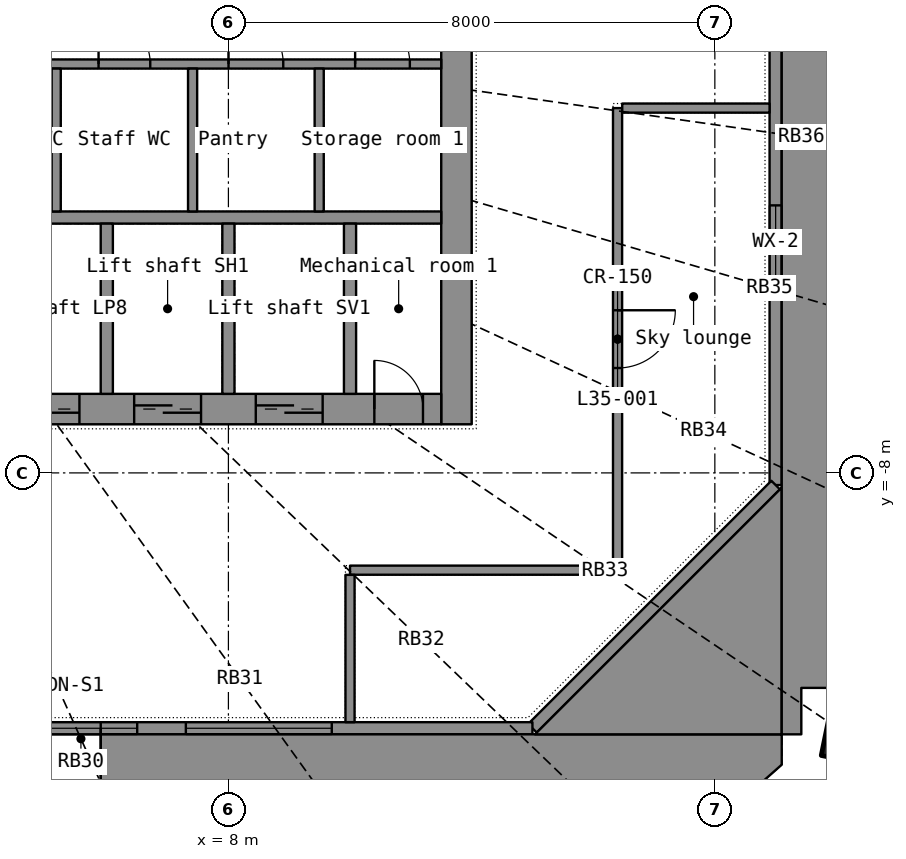
"""IFC4 building model, lengths in metres.
Left out: names, types, materials, properties, quantities, classifications, styles, units other than length and angle.
Written with IfcOpenShell. Run it as: python <this file> out.ifc"""

import sys

from ifc_helpers import new_model, si_unit, direction, frame, frame_2d, origin, origin_2d, place, context, subcontext, project, spatial, polyline, rectangle, hollow_rectangle, outline, extrude, element, fill, save


model = new_model("IFC4")
c1 = context("Model", 3, precision=1e-05, world=origin(), true_north=direction((0.0, 1.0)))
c2 = subcontext(c1, "Body", "Model", "MODEL_VIEW")
j1 = project(units=[si_unit("LENGTHUNIT", "METRE"), si_unit("PLANEANGLEUNIT", "RADIAN")], contexts=[c1])
p1 = place(None, origin())
s1 = spatial("IfcSite", under=j1, at=p1, CompositionType="ELEMENT")
p2 = place(p1, origin())
s2 = spatial("IfcBuilding", under=s1, at=p2, CompositionType="ELEMENT")
p3 = place(p2, frame((0.0, 0.0, 145.2)))
s3 = spatial("IfcBuildingStorey", under=s2, at=p3, CompositionType="ELEMENT", Elevation=145.2)
p4 = place(p3, frame((18.222, -12.336, 0.0), z_axis=(-0.026511305, 0.018201791, 0.999482789), x_axis=(-0.720044306, -0.693898, -0.00646247)))
e1 = element("IfcColumn", 1, at=p4, inside=s3, PredefinedType="COLUMN", context=c2, shape_type="SweptSolid", body=[
    extrude(hollow_rectangle(XDim=0.8, YDim=0.8, WallThickness=0.025, at=origin_2d()), origin(), (0.0, 0.0, 1.0), 7.404),
])
p5 = place(p3, frame((17.0, 8.2, 0.08), z_axis=(0.0, 0.0, 1.0), x_axis=(0.0, -1.0, 0.0)))
e2 = element("IfcWall", 2, at=p5, inside=s3, PredefinedType="STANDARD", context=c2, shape_type="SweptSolid", body=[
    extrude(rectangle(XDim=16.4, YDim=0.2, at=frame_2d((8.2, 0.0))), origin(), (0.0, 0.0, 1.0), 7.12),
])
p6 = place(p5, frame((7.3, 0.0, 0.0)))
e3 = element("IfcOpeningElement", 3, at=p6, cuts=e2, PredefinedType="OPENING", context=c2, shape_type="SweptSolid", body=[
    extrude(rectangle(XDim=1.8, YDim=2.4, at=frame_2d((0.9, 1.2))), frame((0.0, 0.11, 0.0), z_axis=(0.0, -1.0, 0.0), x_axis=(1.0, 0.0, 0.0)), (0.0, 0.0, 1.0), 0.22),
])
p7 = place(p5, frame((3.4, 0.0, 0.1)))
e4 = element("IfcOpeningElement", 4, at=p7, cuts=e2, PredefinedType="OPENING", context=c2, shape_type="SweptSolid", body=[
    extrude(rectangle(XDim=1.2, YDim=2.2, at=frame_2d((0.6, 1.1))), frame((0.0, 0.11, 0.0), z_axis=(0.0, -1.0, 0.0), x_axis=(1.0, 0.0, 0.0)), (0.0, 0.0, 1.0), 0.22),
])
p8 = place(p5, frame((11.8, 0.0, 0.1)))
e5 = element("IfcOpeningElement", 5, at=p8, cuts=e2, PredefinedType="OPENING", context=c2, shape_type="SweptSolid", body=[
    extrude(rectangle(XDim=1.2, YDim=2.2, at=frame_2d((0.6, 1.1))), frame((0.0, 0.11, 0.0), z_axis=(0.0, -1.0, 0.0), x_axis=(1.0, 0.0, 0.0)), (0.0, 0.0, 1.0), 0.22),
])
p9 = place(p3, frame((17.0, -8.2, 0.08), z_axis=(0.0, 0.0, 1.0), x_axis=(-0.707106781, -0.707106781, 0.0)))
e6 = element("IfcWall", 6, at=p9, inside=s3, PredefinedType="STANDARD", context=c2, shape_type="SweptSolid", body=[
    extrude(rectangle(XDim=5.657, YDim=0.2, at=frame_2d((2.828, 0.0))), origin(), (0.0, 0.0, 1.0), 7.12),
])
p10 = place(p3, frame((13.0, -12.2, 0.08), z_axis=(0.0, 0.0, 1.0), x_axis=(-1.0, 0.0, 0.0)))
e7 = element("IfcWall", 7, at=p10, inside=s3, PredefinedType="STANDARD", context=c2, shape_type="SweptSolid", body=[
    extrude(rectangle(XDim=26.0, YDim=0.2, at=frame_2d((13.0, 0.0))), origin(), (0.0, 0.0, 1.0), 7.12),
])
p11 = place(p10, frame((7.1, 0.0, 0.0)))
e8 = element("IfcOpeningElement", 8, at=p11, cuts=e7, PredefinedType="OPENING", context=c2, shape_type="SweptSolid", body=[
    extrude(rectangle(XDim=1.8, YDim=2.4, at=frame_2d((0.9, 1.2))), frame((0.0, 0.11, 0.0), z_axis=(0.0, -1.0, 0.0), x_axis=(1.0, 0.0, 0.0)), (0.0, 0.0, 1.0), 0.22),
])
p12 = place(p10, frame((17.1, 0.0, 0.0)))
e9 = element("IfcOpeningElement", 9, at=p12, cuts=e7, PredefinedType="OPENING", context=c2, shape_type="SweptSolid", body=[
    extrude(rectangle(XDim=1.8, YDim=2.4, at=frame_2d((0.9, 1.2))), frame((0.0, 0.11, 0.0), z_axis=(0.0, -1.0, 0.0), x_axis=(1.0, 0.0, 0.0)), (0.0, 0.0, 1.0), 0.22),
])
p13 = place(p10, frame((3.3, 0.0, 0.9)))
e10 = element("IfcOpeningElement", 10, at=p13, cuts=e7, PredefinedType="OPENING", context=c2, shape_type="SweptSolid", body=[
    extrude(rectangle(XDim=2.4, YDim=1.5, at=frame_2d((1.2, 0.75))), frame((0.0, 0.11, 0.0), z_axis=(0.0, -1.0, 0.0), x_axis=(1.0, 0.0, 0.0)), (0.0, 0.0, 1.0), 0.22),
])
p14 = place(p10, frame((11.8, 0.0, 0.9)))
e11 = element("IfcOpeningElement", 11, at=p14, cuts=e7, PredefinedType="OPENING", context=c2, shape_type="SweptSolid", body=[
    extrude(rectangle(XDim=2.4, YDim=1.5, at=frame_2d((1.2, 0.75))), frame((0.0, 0.11, 0.0), z_axis=(0.0, -1.0, 0.0), x_axis=(1.0, 0.0, 0.0)), (0.0, 0.0, 1.0), 0.22),
])
p15 = place(p10, frame((20.3, 0.0, 0.9)))
e12 = element("IfcOpeningElement", 12, at=p15, cuts=e7, PredefinedType="OPENING", context=c2, shape_type="SweptSolid", body=[
    extrude(rectangle(XDim=2.4, YDim=1.5, at=frame_2d((1.2, 0.75))), frame((0.0, 0.11, 0.0), z_axis=(0.0, -1.0, 0.0), x_axis=(1.0, 0.0, 0.0)), (0.0, 0.0, 1.0), 0.22),
])
p16 = place(p10, frame((6.5, 0.0, 3.2)))
e13 = element("IfcOpeningElement", 13, at=p16, cuts=e7, PredefinedType="OPENING", context=c2, shape_type="SweptSolid", body=[
    extrude(rectangle(XDim=3.0, YDim=1.0, at=frame_2d((1.5, 0.5))), frame((0.0, 0.11, 0.0), z_axis=(0.0, -1.0, 0.0), x_axis=(1.0, 0.0, 0.0)), (0.0, 0.0, 1.0), 0.22),
])
p17 = place(p10, frame((16.5, 0.0, 3.2)))
e14 = element("IfcOpeningElement", 14, at=p17, cuts=e7, PredefinedType="OPENING", context=c2, shape_type="SweptSolid", body=[
    extrude(rectangle(XDim=3.0, YDim=1.0, at=frame_2d((1.5, 0.5))), frame((0.0, 0.11, 0.0), z_axis=(0.0, -1.0, 0.0), x_axis=(1.0, 0.0, 0.0)), (0.0, 0.0, 1.0), 0.22),
])
p18 = place(p3, frame((0.0, 0.0, -0.4)))
e15 = element("IfcWall", 15, at=p18, inside=s3, PredefinedType="ELEMENTEDWALL", context=c2, shape_type="SweptSolid", body=[
    extrude(outline(polyline([(17.1, -12.8), (17.1, -12.3), (13.042, -12.3), (5.9, -12.3), (5.9, -18.26), (6.031, -18.236), (7.357, -17.898), (7.357, -17.304), (8.957, -17.304), (8.957, -17.41), (9.848, -17.111), (10.763, -16.725), (10.763, -15.372), (12.813, -15.372), (12.813, -15.75), (13.366, -15.465), (14.506, -14.757), (14.506, -13.924), (15.704, -13.924), (16.478, -13.35), (17.1, -12.8)])), origin(), (0.0, 0.0, 1.0), 1.58),
])
p19 = place(p3, frame((0.0, 0.0, -0.4)))
e16 = element("IfcWall", 16, at=p19, inside=s3, PredefinedType="ELEMENTEDWALL", context=c2, shape_type="SweptSolid", body=[
    extrude(outline(polyline([(13.042, -12.3), (17.1, -12.3), (17.1, -8.241), (13.042, -12.3)])), origin(), (0.0, 0.0, 1.0), 1.58),
])
p20 = place(p3, frame((0.0, 0.0, -0.4)))
e17 = element("IfcWall", 17, at=p20, inside=s3, PredefinedType="ELEMENTEDWALL", context=c2, shape_type="SweptSolid", body=[
    extrude(outline(polyline([(22.509, -4.886), (22.719, -4.119), (22.562, -4.119), (22.562, -2.519), (23.072, -2.519), (23.214, -1.646), (23.248, -1.025), (22.392, -1.025), (22.392, -0.9), (17.1, -0.9), (17.1, -8.241), (17.1, -12.3), (17.422, -12.3), (17.422, -11.536), (18.419, -11.536), (19.088, -10.829), (19.4, -10.432), (19.308, -10.432), (19.308, -8.382), (20.86, -8.382), (21.119, -7.979), (21.507, -7.221), (21.507, -5.744), (22.175, -5.744), (22.509, -4.886)])), origin(), (0.0, 0.0, 1.0), 1.58),
])
p21 = place(p3, frame((11.75, -7.2, 0.0), z_axis=(0.0, 0.0, 1.0), x_axis=(0.0, 1.0, 0.0)))
e18 = element("IfcWall", 18, at=p21, inside=s3, PredefinedType="SHEAR", context=c2, shape_type="SweptSolid", body=[
    extrude(rectangle(XDim=14.4, YDim=0.5, at=frame_2d((7.2, 0.0))), origin(), (0.0, 0.0, 1.0), 7.0),
])
p22 = place(p21, frame((6.5, 0.0, 0.0)))
e19 = element("IfcOpeningElement", 19, at=p22, cuts=e18, PredefinedType="OPENING", context=c2, shape_type="SweptSolid", body=[
    extrude(rectangle(XDim=1.4, YDim=2.2, at=frame_2d((0.7, 1.1))), frame((0.0, 0.26, 0.0), z_axis=(0.0, -1.0, 0.0), x_axis=(1.0, 0.0, 0.0)), (0.0, 0.0, 1.0), 0.52),
])
p23 = place(p3, frame((-11.5, -6.95, 0.0), z_axis=(0.0, 0.0, 1.0), x_axis=(1.0, 0.0, 0.0)))
e20 = element("IfcWall", 20, at=p23, inside=s3, PredefinedType="SHEAR", context=c2, shape_type="SweptSolid", body=[
    extrude(rectangle(XDim=23.0, YDim=0.5, at=frame_2d((11.5, 0.0))), origin(), (0.0, 0.0, 1.0), 7.0),
])
p24 = place(p23, frame((1.95, 0.0, 0.0)))
e21 = element("IfcOpeningElement", 21, at=p24, cuts=e20, PredefinedType="OPENING", context=c2, shape_type="SweptSolid", body=[
    extrude(rectangle(XDim=1.1, YDim=2.2, at=frame_2d((0.55, 1.1))), frame((0.0, 0.26, 0.0), z_axis=(0.0, -1.0, 0.0), x_axis=(1.0, 0.0, 0.0)), (0.0, 0.0, 1.0), 0.52),
])
p25 = place(p23, frame((3.95, 0.0, 0.0)))
e22 = element("IfcOpeningElement", 22, at=p25, cuts=e20, PredefinedType="OPENING", context=c2, shape_type="SweptSolid", body=[
    extrude(rectangle(XDim=1.1, YDim=2.2, at=frame_2d((0.55, 1.1))), frame((0.0, 0.26, 0.0), z_axis=(0.0, -1.0, 0.0), x_axis=(1.0, 0.0, 0.0)), (0.0, 0.0, 1.0), 0.52),
])
p26 = place(p23, frame((5.95, 0.0, 0.0)))
e23 = element("IfcOpeningElement", 23, at=p26, cuts=e20, PredefinedType="OPENING", context=c2, shape_type="SweptSolid", body=[
    extrude(rectangle(XDim=1.1, YDim=2.2, at=frame_2d((0.55, 1.1))), frame((0.0, 0.26, 0.0), z_axis=(0.0, -1.0, 0.0), x_axis=(1.0, 0.0, 0.0)), (0.0, 0.0, 1.0), 0.52),
])
p27 = place(p23, frame((7.95, 0.0, 0.0)))
e24 = element("IfcOpeningElement", 24, at=p27, cuts=e20, PredefinedType="OPENING", context=c2, shape_type="SweptSolid", body=[
    extrude(rectangle(XDim=1.1, YDim=2.2, at=frame_2d((0.55, 1.1))), frame((0.0, 0.26, 0.0), z_axis=(0.0, -1.0, 0.0), x_axis=(1.0, 0.0, 0.0)), (0.0, 0.0, 1.0), 0.52),
])
p28 = place(p23, frame((9.95, 0.0, 0.0)))
e25 = element("IfcOpeningElement", 25, at=p28, cuts=e20, PredefinedType="OPENING", context=c2, shape_type="SweptSolid", body=[
    extrude(rectangle(XDim=1.1, YDim=2.2, at=frame_2d((0.55, 1.1))), frame((0.0, 0.26, 0.0), z_axis=(0.0, -1.0, 0.0), x_axis=(1.0, 0.0, 0.0)), (0.0, 0.0, 1.0), 0.52),
])
p29 = place(p23, frame((11.95, 0.0, 0.0)))
e26 = element("IfcOpeningElement", 26, at=p29, cuts=e20, PredefinedType="OPENING", context=c2, shape_type="SweptSolid", body=[
    extrude(rectangle(XDim=1.1, YDim=2.2, at=frame_2d((0.55, 1.1))), frame((0.0, 0.26, 0.0), z_axis=(0.0, -1.0, 0.0), x_axis=(1.0, 0.0, 0.0)), (0.0, 0.0, 1.0), 0.52),
])
p30 = place(p23, frame((13.95, 0.0, 0.0)))
e27 = element("IfcOpeningElement", 27, at=p30, cuts=e20, PredefinedType="OPENING", context=c2, shape_type="SweptSolid", body=[
    extrude(rectangle(XDim=1.1, YDim=2.2, at=frame_2d((0.55, 1.1))), frame((0.0, 0.26, 0.0), z_axis=(0.0, -1.0, 0.0), x_axis=(1.0, 0.0, 0.0)), (0.0, 0.0, 1.0), 0.52),
])
p31 = place(p23, frame((15.95, 0.0, 0.0)))
e28 = element("IfcOpeningElement", 28, at=p31, cuts=e20, PredefinedType="OPENING", context=c2, shape_type="SweptSolid", body=[
    extrude(rectangle(XDim=1.1, YDim=2.2, at=frame_2d((0.55, 1.1))), frame((0.0, 0.26, 0.0), z_axis=(0.0, -1.0, 0.0), x_axis=(1.0, 0.0, 0.0)), (0.0, 0.0, 1.0), 0.52),
])
p32 = place(p23, frame((17.95, 0.0, 0.0)))
e29 = element("IfcOpeningElement", 29, at=p32, cuts=e20, PredefinedType="OPENING", context=c2, shape_type="SweptSolid", body=[
    extrude(rectangle(XDim=1.1, YDim=2.2, at=frame_2d((0.55, 1.1))), frame((0.0, 0.26, 0.0), z_axis=(0.0, -1.0, 0.0), x_axis=(1.0, 0.0, 0.0)), (0.0, 0.0, 1.0), 0.52),
])
p33 = place(p23, frame((19.95, 0.0, 0.0)))
e30 = element("IfcOpeningElement", 30, at=p33, cuts=e20, PredefinedType="OPENING", context=c2, shape_type="SweptSolid", body=[
    extrude(rectangle(XDim=1.1, YDim=2.2, at=frame_2d((0.55, 1.1))), frame((0.0, 0.26, 0.0), z_axis=(0.0, -1.0, 0.0), x_axis=(1.0, 0.0, 0.0)), (0.0, 0.0, 1.0), 0.52),
])
p34 = place(p23, frame((0.3, 0.0, 0.0)))
e31 = element("IfcOpeningElement", 31, at=p34, cuts=e20, PredefinedType="OPENING", context=c2, shape_type="SweptSolid", body=[
    extrude(rectangle(XDim=0.8, YDim=2.05, at=frame_2d((0.4, 1.025))), frame((0.0, 0.26, 0.0), z_axis=(0.0, -1.0, 0.0), x_axis=(1.0, 0.0, 0.0)), (0.0, 0.0, 1.0), 0.52),
])
p35 = place(p23, frame((21.9, 0.0, 0.0)))
e32 = element("IfcOpeningElement", 32, at=p35, cuts=e20, PredefinedType="OPENING", context=c2, shape_type="SweptSolid", body=[
    extrude(rectangle(XDim=0.8, YDim=2.05, at=frame_2d((0.4, 1.025))), frame((0.0, 0.26, 0.0), z_axis=(0.0, -1.0, 0.0), x_axis=(1.0, 0.0, 0.0)), (0.0, 0.0, 1.0), 0.52),
])
p36 = place(p3, frame((-11.5, -3.8, 0.0), z_axis=(0.0, 0.0, 1.0), x_axis=(1.0, 0.0, 0.0)))
e33 = element("IfcWall", 33, at=p36, inside=s3, PredefinedType="SHEAR", context=c2, shape_type="SweptSolid", body=[
    extrude(rectangle(XDim=23.0, YDim=0.2, at=frame_2d((11.5, 0.0))), origin(), (0.0, 0.0, 1.0), 7.0),
])
for number, where, z_axis, x_axis in (
    (34, (6.0, -6.7, 0.0), (0.0, 0.0, 1.0), (0.0, 1.0, 0.0)),
    (35, (8.0, -6.7, 0.0), (0.0, 0.0, 1.0), (0.0, 1.0, 0.0)),
    (36, (10.0, -6.7, 0.0), (0.0, 0.0, 1.0), (0.0, 1.0, 0.0)),
):
    element("IfcWall", number, at=place(p3, frame(where, z_axis=z_axis, x_axis=x_axis)), inside=s3, PredefinedType="SHEAR", context=c2, shape_type="SweptSolid", body=[
        extrude(rectangle(XDim=2.8, YDim=0.2, at=frame_2d((1.4, 0.0))), origin(), (0.0, 0.0, 1.0), 7.0),
    ])
p37 = place(p3, frame((3.0, -1.275, 0.0), z_axis=(0.0, 0.0, 1.0), x_axis=(1.0, 0.0, 0.0)))
e37 = element("IfcWall", 37, at=p37, inside=s3, PredefinedType="PARTITIONING", context=c2, shape_type="SweptSolid", body=[
    extrude(rectangle(XDim=8.5, YDim=0.15, at=frame_2d((4.25, 0.0))), origin(), (0.0, 0.0, 1.0), 7.0),
])
p38 = place(p37, frame((0.622, 0.0, 0.0)))
e38 = element("IfcOpeningElement", 38, at=p38, cuts=e37, PredefinedType="OPENING", context=c2, shape_type="SweptSolid", body=[
    extrude(rectangle(XDim=0.85, YDim=2.1, at=frame_2d((0.425, 1.05))), frame((0.0, 0.085, 0.0), z_axis=(0.0, -1.0, 0.0), x_axis=(1.0, 0.0, 0.0)), (0.0, 0.0, 1.0), 0.17),
])
p39 = place(p37, frame((2.865, 0.0, 0.0)))
e39 = element("IfcOpeningElement", 39, at=p39, cuts=e37, PredefinedType="OPENING", context=c2, shape_type="SweptSolid", body=[
    extrude(rectangle(XDim=0.85, YDim=2.1, at=frame_2d((0.425, 1.05))), frame((0.0, 0.085, 0.0), z_axis=(0.0, -1.0, 0.0), x_axis=(1.0, 0.0, 0.0)), (0.0, 0.0, 1.0), 0.17),
])
p40 = place(p37, frame((5.002, 0.0, 0.0)))
e40 = element("IfcOpeningElement", 40, at=p40, cuts=e37, PredefinedType="OPENING", context=c2, shape_type="SweptSolid", body=[
    extrude(rectangle(XDim=0.9, YDim=2.1, at=frame_2d((0.45, 1.05))), frame((0.0, 0.085, 0.0), z_axis=(0.0, -1.0, 0.0), x_axis=(1.0, 0.0, 0.0)), (0.0, 0.0, 1.0), 0.17),
])
p41 = place(p37, frame((7.084, 0.0, 0.0)))
e41 = element("IfcOpeningElement", 41, at=p41, cuts=e37, PredefinedType="OPENING", context=c2, shape_type="SweptSolid", body=[
    extrude(rectangle(XDim=0.9, YDim=2.1, at=frame_2d((0.45, 1.05))), frame((0.0, 0.085, 0.0), z_axis=(0.0, -1.0, 0.0), x_axis=(1.0, 0.0, 0.0)), (0.0, 0.0, 1.0), 0.17),
])
for number, where, z_axis, x_axis in (
    (42, (5.168, -3.7, 0.0), (0.0, 0.0, 1.0), (0.0, 1.0, 0.0)),
    (43, (7.411, -3.7, 0.0), (0.0, 0.0, 1.0), (0.0, 1.0, 0.0)),
    (44, (9.493, -3.7, 0.0), (0.0, 0.0, 1.0), (0.0, 1.0, 0.0)),
):
    element("IfcWall", number, at=place(p3, frame(where, z_axis=z_axis, x_axis=x_axis)), inside=s3, PredefinedType="PARTITIONING", context=c2, shape_type="SweptSolid", body=[
        extrude(rectangle(XDim=2.35, YDim=0.15, at=frame_2d((1.175, 0.0))), origin(), (0.0, 0.0, 1.0), 7.0),
    ])
p42 = place(p3, frame((14.4, -2.0, 0.0), z_axis=(0.0, 0.0, 1.0), x_axis=(0.0, -1.0, 0.0)))
e45 = element("IfcWall", 45, at=p42, inside=s3, PredefinedType="PARTITIONING", context=c2, shape_type="SweptSolid", body=[
    extrude(rectangle(XDim=7.6, YDim=0.15, at=frame_2d((3.8, 0.0))), origin(), (0.0, 0.0, 1.0), 6.1),
])
p43 = place(p42, frame((3.325, 0.0, 0.0)))
e46 = element("IfcOpeningElement", 46, at=p43, cuts=e45, PredefinedType="OPENING", context=c2, shape_type="SweptSolid", body=[
    extrude(rectangle(XDim=0.95, YDim=2.15, at=frame_2d((0.475, 1.075))), frame((0.0, 0.085, 0.0), z_axis=(0.0, -1.0, 0.0), x_axis=(1.0, 0.0, 0.0)), (0.0, 0.0, 1.0), 0.17),
])
p44 = place(p3, frame((14.323, -9.6, 0.0), z_axis=(0.0, 0.0, 1.0), x_axis=(-1.0, 0.0, 0.0)))
e47 = element("IfcWall", 47, at=p44, inside=s3, PredefinedType="PARTITIONING", context=c2, shape_type="SweptSolid", body=[
    extrude(rectangle(XDim=4.323, YDim=0.15, at=frame_2d((2.162, 0.0))), origin(), (0.0, 0.0, 1.0), 6.1),
])
p45 = place(p3, frame((10.0, -9.677, 0.0), z_axis=(0.0, 0.0, 1.0), x_axis=(0.0, -1.0, 0.0)))
e48 = element("IfcWall", 48, at=p45, inside=s3, PredefinedType="PARTITIONING", context=c2, shape_type="SweptSolid", body=[
    extrude(rectangle(XDim=2.423, YDim=0.15, at=frame_2d((1.211, 0.0))), origin(), (0.0, 0.0, 1.0), 6.1),
])
p46 = place(p3, frame((16.9, -2.0, 0.0), z_axis=(0.0, 0.0, 1.0), x_axis=(-1.0, 0.0, 0.0)))
e49 = element("IfcWall", 49, at=p46, inside=s3, PredefinedType="PARTITIONING", context=c2, shape_type="SweptSolid", body=[
    extrude(rectangle(XDim=2.423, YDim=0.15, at=frame_2d((1.211, 0.0))), origin(), (0.0, 0.0, 1.0), 6.1),
])
p47 = place(p8, origin())
e50 = element("IfcWindow", 50, at=p47, inside=s3, PartitioningType="SINGLE_PANEL", PredefinedType="WINDOW", context=c2, shape_type="SweptSolid", body=[
    extrude(rectangle(XDim=1.2, YDim=2.2, at=frame_2d((0.6, 1.1))), frame((0.0, 0.03, 0.0), z_axis=(0.0, -1.0, 0.0), x_axis=(1.0, 0.0, 0.0)), (0.0, 0.0, 1.0), 0.06),
])
fill(e5, e50)
p48 = place(p11, origin())
e51 = element("IfcDoor", 51, at=p48, inside=s3, OperationType="DOUBLE_DOOR_SINGLE_SWING", PredefinedType="DOOR", context=c2, shape_type="SweptSolid", body=[
    extrude(rectangle(XDim=1.8, YDim=2.4, at=frame_2d((0.9, 1.2))), frame((0.0, 0.025, 0.0), z_axis=(0.0, -1.0, 0.0), x_axis=(1.0, 0.0, 0.0)), (0.0, 0.0, 1.0), 0.05),
])
fill(e8, e51)
p49 = place(p13, origin())
e52 = element("IfcWindow", 52, at=p49, inside=s3, PartitioningType="SINGLE_PANEL", PredefinedType="WINDOW", context=c2, shape_type="SweptSolid", body=[
    extrude(rectangle(XDim=2.4, YDim=1.5, at=frame_2d((1.2, 0.75))), frame((0.0, 0.03, 0.0), z_axis=(0.0, -1.0, 0.0), x_axis=(1.0, 0.0, 0.0)), (0.0, 0.0, 1.0), 0.06),
])
fill(e10, e52)
p50 = place(p16, origin())
e53 = element("IfcWindow", 53, at=p50, inside=s3, PartitioningType="SINGLE_PANEL", PredefinedType="WINDOW", context=c2, shape_type="SweptSolid", body=[
    extrude(rectangle(XDim=3.0, YDim=1.0, at=frame_2d((1.5, 0.5))), frame((0.0, 0.03, 0.0), z_axis=(0.0, -1.0, 0.0), x_axis=(1.0, 0.0, 0.0)), (0.0, 0.0, 1.0), 0.06),
])
fill(e13, e53)
p51 = place(p31, origin())
e54 = element("IfcDoor", 54, at=p51, inside=s3, OperationType="DOUBLE_DOOR_SLIDING", PredefinedType="DOOR", context=c2, shape_type="SweptSolid", body=[
    extrude(rectangle(XDim=1.1, YDim=2.2, at=frame_2d((0.55, 1.1))), frame((0.0, 0.025, 0.0), z_axis=(0.0, -1.0, 0.0), x_axis=(1.0, 0.0, 0.0)), (0.0, 0.0, 1.0), 0.05),
])
fill(e28, e54)
p52 = place(p32, origin())
e55 = element("IfcDoor", 55, at=p52, inside=s3, OperationType="DOUBLE_DOOR_SLIDING", PredefinedType="DOOR", context=c2, shape_type="SweptSolid", body=[
    extrude(rectangle(XDim=1.1, YDim=2.2, at=frame_2d((0.55, 1.1))), frame((0.0, 0.025, 0.0), z_axis=(0.0, -1.0, 0.0), x_axis=(1.0, 0.0, 0.0)), (0.0, 0.0, 1.0), 0.05),
])
fill(e29, e55)
p53 = place(p33, origin())
e56 = element("IfcDoor", 56, at=p53, inside=s3, OperationType="DOUBLE_DOOR_SLIDING", PredefinedType="DOOR", context=c2, shape_type="SweptSolid", body=[
    extrude(rectangle(XDim=1.1, YDim=2.2, at=frame_2d((0.55, 1.1))), frame((0.0, 0.025, 0.0), z_axis=(0.0, -1.0, 0.0), x_axis=(1.0, 0.0, 0.0)), (0.0, 0.0, 1.0), 0.05),
])
fill(e30, e56)
p54 = place(p35, origin())
e57 = element("IfcDoor", 57, at=p54, inside=s3, OperationType="SINGLE_SWING_LEFT", PredefinedType="DOOR", context=c2, shape_type="SweptSolid", body=[
    extrude(rectangle(XDim=0.8, YDim=2.05, at=frame_2d((0.4, 1.025))), frame((0.0, 0.025, 0.0), z_axis=(0.0, -1.0, 0.0), x_axis=(1.0, 0.0, 0.0)), (0.0, 0.0, 1.0), 0.05),
])
fill(e32, e57)
p55 = place(p39, origin())
e58 = element("IfcDoor", 58, at=p55, inside=s3, OperationType="SINGLE_SWING_LEFT", PredefinedType="DOOR", context=c2, shape_type="SweptSolid", body=[
    extrude(rectangle(XDim=0.85, YDim=2.1, at=frame_2d((0.425, 1.05))), frame((0.0, 0.025, 0.0), z_axis=(0.0, -1.0, 0.0), x_axis=(1.0, 0.0, 0.0)), (0.0, 0.0, 1.0), 0.05),
])
fill(e39, e58)
p56 = place(p40, origin())
e59 = element("IfcDoor", 59, at=p56, inside=s3, OperationType="SINGLE_SWING_LEFT", PredefinedType="DOOR", context=c2, shape_type="SweptSolid", body=[
    extrude(rectangle(XDim=0.9, YDim=2.1, at=frame_2d((0.45, 1.05))), frame((0.0, 0.025, 0.0), z_axis=(0.0, -1.0, 0.0), x_axis=(1.0, 0.0, 0.0)), (0.0, 0.0, 1.0), 0.05),
])
fill(e40, e59)
p57 = place(p41, origin())
e60 = element("IfcDoor", 60, at=p57, inside=s3, OperationType="SINGLE_SWING_LEFT", PredefinedType="DOOR", context=c2, shape_type="SweptSolid", body=[
    extrude(rectangle(XDim=0.9, YDim=2.1, at=frame_2d((0.45, 1.05))), frame((0.0, 0.025, 0.0), z_axis=(0.0, -1.0, 0.0), x_axis=(1.0, 0.0, 0.0)), (0.0, 0.0, 1.0), 0.05),
])
fill(e41, e60)
p58 = place(p43, origin())
e61 = element("IfcDoor", 61, at=p58, inside=s3, OperationType="SINGLE_SWING_LEFT", PredefinedType="DOOR", context=c2, shape_type="SweptSolid", body=[
    extrude(rectangle(XDim=0.95, YDim=2.15, at=frame_2d((0.475, 1.075))), frame((0.0, 0.025, 0.0), z_axis=(0.0, -1.0, 0.0), x_axis=(1.0, 0.0, 0.0)), (0.0, 0.0, 1.0), 0.05),
])
fill(e46, e61)
save(model, sys.argv[1])
